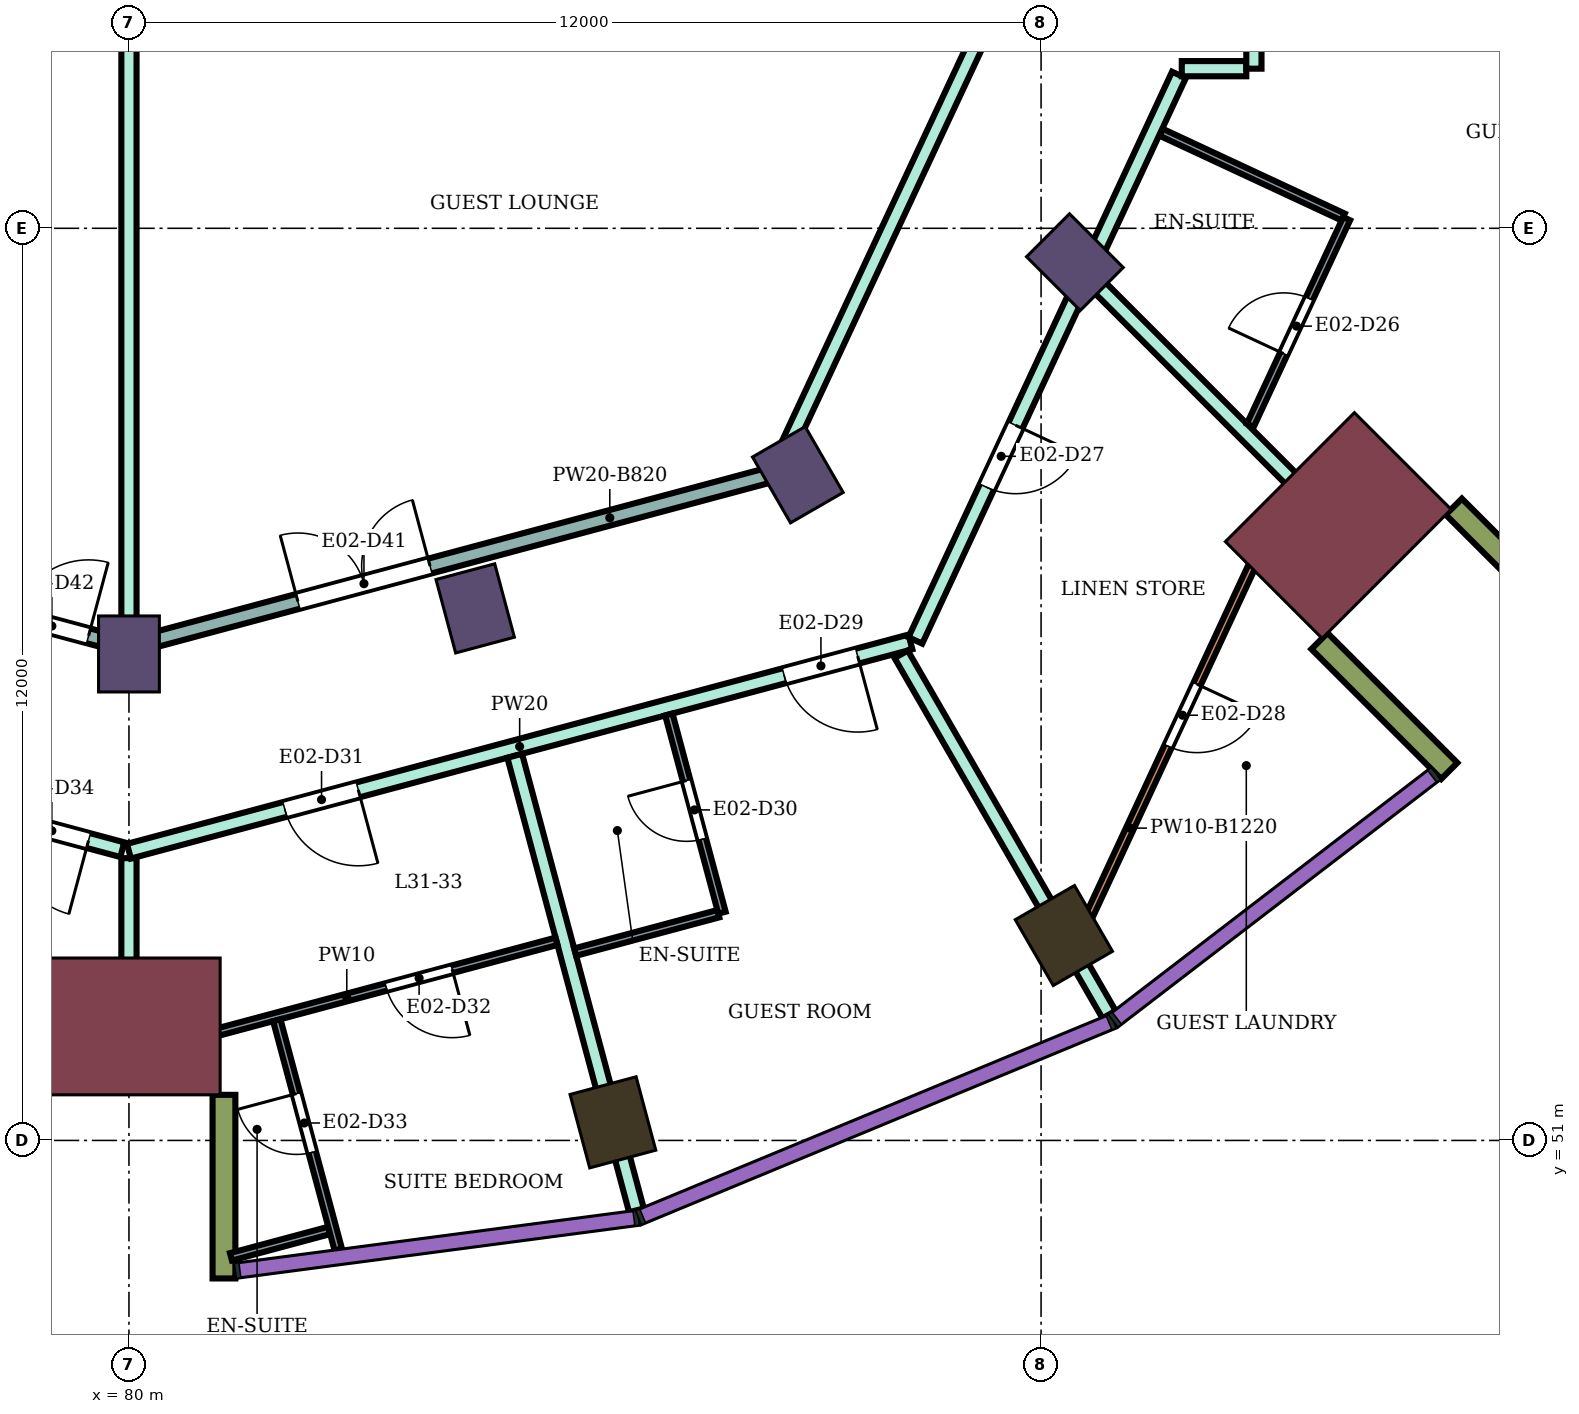
"""IFC4 building model, lengths in metres.
Left out: names, types, materials, properties, quantities, classifications, styles, units other than length and angle.
Written with IfcOpenShell. Run it as: python <this file> out.ifc"""

import sys

from ifc_helpers import new_model, si_unit, direction, frame, frame_2d, origin, origin_2d, place, context, subcontext, project, spatial, rectangle, extrude, element, fill, save


model = new_model("IFC4")
c1 = context("Model", 3, precision=1e-05, world=origin(), true_north=direction((0.0, 1.0)))
c2 = subcontext(c1, "Body", "Model", "MODEL_VIEW")
j1 = project(units=[si_unit("LENGTHUNIT", "METRE"), si_unit("PLANEANGLEUNIT", "RADIAN")], contexts=[c1])
p1 = place(None, origin())
s1 = spatial("IfcSite", under=j1, at=p1, CompositionType="ELEMENT")
p2 = place(p1, origin())
s2 = spatial("IfcBuilding", under=s1, at=p2, CompositionType="ELEMENT")
p3 = place(p2, frame((0.0, 0.0, 134.1)))
s3 = spatial("IfcBuildingStorey", under=s2, at=p3, CompositionType="ELEMENT", Elevation=134.1)
for number, where, z_axis, x_axis in (
    (1, (86.367, 51.238, 0.0), (0.0, 0.0, 1.0), (0.259, -0.966, 0.0)),
    (2, (92.3, 53.696, 0.0), (0.0, 0.0, 1.0), (0.5, -0.866, 0.0)),
):
    element("IfcColumn", number, at=place(p3, frame(where, z_axis=z_axis, x_axis=x_axis)), inside=s3, PredefinedType="COLUMN", context=c2, shape_type="SweptSolid", body=[
        extrude(rectangle(XDim=1.0, YDim=0.9, at=origin_2d()), origin(), (0.0, 0.0, 1.0), 3.9),
    ])
for number, where, z_axis, x_axis in (
    (3, (80.0, 57.4, 0.0), (0.0, 0.0, 1.0), (0.0, -1.0, 0.0)),
    (4, (84.555, 58.0, 0.0), (0.0, 0.0, 1.0), (0.259, -0.966, 0.0)),
    (5, (88.8, 59.758, 0.0), (0.0, 0.0, 1.0), (0.5, -0.866, 0.0)),
    (6, (92.445, 62.555, 0.0), (0.0, 0.0, 1.0), (0.707, -0.707, 0.0)),
):
    element("IfcColumn", number, at=place(p3, frame(where, z_axis=z_axis, x_axis=x_axis)), inside=s3, PredefinedType="COLUMN", context=c2, shape_type="SweptSolid", body=[
        extrude(rectangle(XDim=1.0, YDim=0.8, at=origin_2d()), origin(), (0.0, 0.0, 1.0), 3.9),
    ])
for number, where, z_axis, x_axis in (
    (7, (80.0, 52.5, 0.0), (0.0, 0.0, 1.0), (0.0, -1.0, 0.0)),
    (8, (95.91, 59.09, 0.0), (0.0, 0.0, 1.0), (0.707, -0.707, 0.0)),
):
    element("IfcColumn", number, at=place(p3, frame(where, z_axis=z_axis, x_axis=x_axis)), inside=s3, PredefinedType="COLUMN", context=c2, shape_type="SweptSolid", body=[
        extrude(rectangle(XDim=1.8, YDim=2.4, at=origin_2d()), origin(), (0.0, 0.0, 1.0), 3.9),
    ])
for number, where, z_axis, x_axis in (
    (9, (81.25, 51.6, 0.0), (0.0, 0.0, 1.0), (0.0, -1.0, 0.0)),
    (10, (95.662, 57.57, 0.0), (0.0, 0.0, 1.0), (0.707, -0.707, 0.0)),
    (11, (97.43, 59.338, 0.0), (0.0, 0.0, 1.0), (0.707, -0.707, 0.0)),
):
    element("IfcWall", number, at=place(p3, frame(where, z_axis=z_axis, x_axis=x_axis)), inside=s3, PredefinedType="NOTDEFINED", context=c2, shape_type="SweptSolid", body=[
        extrude(rectangle(XDim=2.416, YDim=0.3, at=frame_2d((1.208, 0.0))), origin(), (0.0, 0.0, 1.0), 3.9),
    ])
p4 = place(p3, frame((69.652, 57.578, 0.0), z_axis=(0.0, 0.0, 1.0), x_axis=(0.965851674805, -0.259095623807, 0.0)))
e12 = element("IfcWall", 12, at=p4, inside=s3, PredefinedType="PARTITIONING", context=c2, shape_type="SweptSolid", body=[
    extrude(rectangle(XDim=10.623, YDim=0.2, at=frame_2d((5.312, 0.0))), origin(), (0.0, 0.0, 1.0), 3.45),
])
p5 = place(p4, frame((9.163, 0.0, 0.0)))
e13 = element("IfcOpeningElement", 13, at=p5, cuts=e12, PredefinedType="OPENING", context=c2, shape_type="SweptSolid", body=[
    extrude(rectangle(XDim=1.0, YDim=2.1, at=frame_2d((0.5, 1.05))), frame((0.0, 0.11, 0.0), z_axis=(0.0, -1.0, 0.0), x_axis=(1.0, 0.0, 0.0)), (0.0, 0.0, 1.0), 0.22),
])
p6 = place(p3, frame((71.498, 59.774, 0.0), z_axis=(0.0, 0.0, 1.0), x_axis=(0.965912232838, -0.258869771225, 0.0)))
e14 = element("IfcWall", 14, at=p6, inside=s3, PredefinedType="PARTITIONING", context=c2, shape_type="SweptSolid", body=[
    extrude(rectangle(XDim=8.672, YDim=0.2, at=frame_2d((4.336, 0.0))), origin(), (0.0, 0.0, 1.0), 3.08),
])
p7 = place(p6, frame((7.252, 0.0, 0.0)))
e15 = element("IfcOpeningElement", 15, at=p7, cuts=e14, PredefinedType="OPENING", context=c2, shape_type="SweptSolid", body=[
    extrude(rectangle(XDim=1.0, YDim=2.1, at=frame_2d((0.5, 1.05))), frame((0.0, 0.11, 0.0), z_axis=(0.0, -1.0, 0.0), x_axis=(1.0, 0.0, 0.0)), (0.0, 0.0, 1.0), 0.22),
])
p8 = place(p3, frame((80.0, 51.8, 0.0), z_axis=(0.0, 0.0, 1.0), x_axis=(0.0, 1.0, 0.0)))
e16 = element("IfcWall", 16, at=p8, inside=s3, PredefinedType="PARTITIONING", context=c2, shape_type="SweptSolid", body=[
    extrude(rectangle(XDim=2.914, YDim=0.2, at=frame_2d((1.457, 0.0))), origin(), (0.0, 0.0, 1.0), 3.45),
])
p9 = place(p3, frame((80.0, 54.805, 0.0), z_axis=(0.0, 0.0, 1.0), x_axis=(0.965967909695, 0.258661936588, 0.0)))
e17 = element("IfcWall", 17, at=p9, inside=s3, PredefinedType="PARTITIONING", context=c2, shape_type="SweptSolid", body=[
    extrude(rectangle(XDim=10.643, YDim=0.2, at=frame_2d((5.322, 0.0))), origin(), (0.0, 0.0, 1.0), 3.45),
])
p10 = place(p9, frame((8.925, 0.0, 0.0)))
e18 = element("IfcOpeningElement", 18, at=p10, cuts=e17, PredefinedType="OPENING", context=c2, shape_type="SweptSolid", body=[
    extrude(rectangle(XDim=1.0, YDim=2.1, at=frame_2d((0.5, 1.05))), frame((0.0, 0.11, 0.0), z_axis=(0.0, -1.0, 0.0), x_axis=(1.0, 0.0, 0.0)), (0.0, 0.0, 1.0), 0.22),
])
p11 = place(p9, frame((2.123, 0.0, 0.0)))
e19 = element("IfcOpeningElement", 19, at=p11, cuts=e17, PredefinedType="OPENING", context=c2, shape_type="SweptSolid", body=[
    extrude(rectangle(XDim=1.0, YDim=2.1, at=frame_2d((0.5, 1.05))), frame((0.0, 0.11, 0.0), z_axis=(0.0, -1.0, 0.0), x_axis=(1.0, 0.0, 0.0)), (0.0, 0.0, 1.0), 0.22),
])
p12 = place(p3, frame((80.0, 57.627, 0.0), z_axis=(0.0, 0.0, 1.0), x_axis=(0.0, 1.0, 0.0)))
e20 = element("IfcWall", 20, at=p12, inside=s3, PredefinedType="PARTITIONING", context=c2, shape_type="SweptSolid", body=[
    extrude(rectangle(XDim=9.673, YDim=0.2, at=frame_2d((4.836, 0.0))), origin(), (0.0, 0.0, 1.0), 3.45),
])
p13 = place(p3, frame((80.001, 57.496, 0.0), z_axis=(0.0, 0.0, 1.0), x_axis=(0.965924211089, 0.258825073035, 0.0)))
e21 = element("IfcWall", 21, at=p13, inside=s3, PredefinedType="PARTITIONING", context=c2, shape_type="SweptSolid", body=[
    extrude(rectangle(XDim=8.731, YDim=0.2, at=frame_2d((4.365, 0.0))), origin(), (0.0, 0.0, 1.0), 3.08),
])
p14 = place(p13, frame((2.3, 0.0, 0.0)))
e22 = element("IfcOpeningElement", 22, at=p14, cuts=e21, PredefinedType="OPENING", context=c2, shape_type="SweptSolid", body=[
    extrude(rectangle(XDim=1.8, YDim=2.1, at=frame_2d((0.9, 1.05))), frame((0.0, 0.11, 0.0), z_axis=(0.0, -1.0, 0.0), x_axis=(1.0, 0.0, 0.0)), (0.0, 0.0, 1.0), 0.22),
])
p15 = place(p3, frame((85.075, 56.061, 0.0), z_axis=(0.0, 0.0, 1.0), x_axis=(0.258703231129, -0.965956851109, 0.0)))
e23 = element("IfcWall", 23, at=p15, inside=s3, PredefinedType="PARTITIONING", context=c2, shape_type="SweptSolid", body=[
    extrude(rectangle(XDim=6.191, YDim=0.2, at=frame_2d((3.095, 0.0))), origin(), (0.0, 0.0, 1.0), 3.45),
])
p16 = place(p3, frame((88.502, 59.774, 0.0), z_axis=(0.0, 0.0, 1.0), x_axis=(0.423423307095, 0.905931952747, 0.0)))
e24 = element("IfcWall", 24, at=p16, inside=s3, PredefinedType="PARTITIONING", context=c2, shape_type="SweptSolid", body=[
    extrude(rectangle(XDim=7.529, YDim=0.2, at=frame_2d((3.764, 0.0))), origin(), (0.0, 0.0, 1.0), 3.45),
])
p17 = place(p3, frame((90.16, 57.396, 0.0), z_axis=(0.0, 0.0, 1.0), x_axis=(0.499848624781, -0.86611278267, 0.0)))
e25 = element("IfcWall", 25, at=p17, inside=s3, PredefinedType="PARTITIONING", context=c2, shape_type="SweptSolid", body=[
    extrude(rectangle(XDim=5.472, YDim=0.2, at=frame_2d((2.736, 0.0))), origin(), (0.0, 0.0, 1.0), 3.45),
])
p18 = place(p3, frame((90.346, 57.578, 0.0), z_axis=(0.0, 0.0, 1.0), x_axis=(0.422476720533, 0.906373775331, 0.0)))
e26 = element("IfcWall", 26, at=p18, inside=s3, PredefinedType="PARTITIONING", context=c2, shape_type="SweptSolid", body=[
    extrude(rectangle(XDim=8.208, YDim=0.2, at=frame_2d((4.104, 0.0))), origin(), (0.0, 0.0, 1.0), 3.45),
])
p19 = place(p18, frame((2.223, 0.0, 0.0)))
e27 = element("IfcOpeningElement", 27, at=p19, cuts=e26, PredefinedType="OPENING", context=c2, shape_type="SweptSolid", body=[
    extrude(rectangle(XDim=0.9, YDim=2.1, at=frame_2d((0.45, 1.05))), frame((0.0, 0.11, 0.0), z_axis=(0.0, -1.0, 0.0), x_axis=(1.0, 0.0, 0.0)), (0.0, 0.0, 1.0), 0.22),
])
p20 = place(p3, frame((92.692, 62.303, 0.0), z_axis=(0.0, 0.0, 1.0), x_axis=(0.706943936447, -0.707269588432, 0.0)))
e28 = element("IfcWall", 28, at=p20, inside=s3, PredefinedType="PARTITIONING", context=c2, shape_type="SweptSolid", body=[
    extrude(rectangle(XDim=5.248, YDim=0.2, at=frame_2d((2.624, 0.0))), origin(), (0.0, 0.0, 1.0), 3.45),
])
p21 = place(p3, frame((93.851, 65.1, 0.0), z_axis=(0.0, 0.0, 1.0), x_axis=(1.0, 0.0, 0.0)))
e29 = element("IfcWall", 29, at=p21, inside=s3, PredefinedType="PARTITIONING", context=c2, shape_type="SweptSolid", body=[
    extrude(rectangle(XDim=0.849, YDim=0.2, at=frame_2d((0.424, 0.0))), origin(), (0.0, 0.0, 1.0), 3.45),
])
p22 = place(p3, frame((94.8, 65.1, 0.0), z_axis=(0.0, 0.0, 1.0), x_axis=(0.0, 1.0, 0.0)))
e30 = element("IfcWall", 30, at=p22, inside=s3, PredefinedType="PARTITIONING", context=c2, shape_type="SweptSolid", body=[
    extrude(rectangle(XDim=1.499, YDim=0.2, at=frame_2d((0.75, 0.0))), origin(), (0.0, 0.0, 1.0), 3.45),
])
p23 = place(p22, frame((0.25, 0.0, 0.0)))
e31 = element("IfcOpeningElement", 31, at=p23, cuts=e30, PredefinedType="OPENING", context=c2, shape_type="SweptSolid", body=[
    extrude(rectangle(XDim=1.0, YDim=2.1, at=frame_2d((0.5, 1.05))), frame((0.0, 0.11, 0.0), z_axis=(0.0, -1.0, 0.0), x_axis=(1.0, 0.0, 0.0)), (0.0, 0.0, 1.0), 0.22),
])
p24 = place(p3, frame((80.106, 52.14, 0.0), z_axis=(0.0, 0.0, 1.0), x_axis=(0.965888724411, 0.25895747152, 0.0)))
e32 = element("IfcWall", 32, at=p24, inside=s3, PredefinedType="PARTITIONING", context=c2, shape_type="SweptSolid", body=[
    extrude(rectangle(XDim=5.714, YDim=0.1, at=frame_2d((2.857, 0.0))), origin(), (0.0, 0.0, 1.0), 3.45),
])
p25 = place(p24, frame((3.392, 0.0, 0.0)))
e33 = element("IfcOpeningElement", 33, at=p25, cuts=e32, PredefinedType="OPENING", context=c2, shape_type="SweptSolid", body=[
    extrude(rectangle(XDim=0.9, YDim=2.1, at=frame_2d((0.45, 1.05))), frame((0.0, 0.06, 0.0), z_axis=(0.0, -1.0, 0.0), x_axis=(1.0, 0.0, 0.0)), (0.0, 0.0, 1.0), 0.12),
])
p26 = place(p3, frame((81.342, 49.469, 0.0), z_axis=(0.0, 0.0, 1.0), x_axis=(0.965825019766, 0.259194967533, 0.0)))
e34 = element("IfcWall", 34, at=p26, inside=s3, PredefinedType="PARTITIONING", context=c2, shape_type="SweptSolid", body=[
    extrude(rectangle(XDim=1.338, YDim=0.1, at=frame_2d((0.669, 0.0))), origin(), (0.0, 0.0, 1.0), 3.45),
])
p27 = place(p3, frame((81.945, 52.582, 0.0), z_axis=(0.0, 0.0, 1.0), x_axis=(0.258941837668, -0.965892915755, 0.0)))
e35 = element("IfcWall", 35, at=p27, inside=s3, PredefinedType="PARTITIONING", context=c2, shape_type="SweptSolid", body=[
    extrude(rectangle(XDim=3.124, YDim=0.1, at=frame_2d((1.562, 0.0))), origin(), (0.0, 0.0, 1.0), 3.45),
])
p28 = place(p27, frame((1.0, 0.0, 0.0)))
e36 = element("IfcOpeningElement", 36, at=p28, cuts=e35, PredefinedType="OPENING", context=c2, shape_type="SweptSolid", body=[
    extrude(rectangle(XDim=0.8, YDim=2.1, at=frame_2d((0.4, 1.05))), frame((0.0, 0.06, 0.0), z_axis=(0.0, -1.0, 0.0), x_axis=(1.0, 0.0, 0.0)), (0.0, 0.0, 1.0), 0.12),
])
p29 = place(p3, frame((85.871, 53.478, 0.0), z_axis=(0.0, 0.0, 1.0), x_axis=(0.965853538138, 0.25908867761, 0.0)))
e37 = element("IfcWall", 37, at=p29, inside=s3, PredefinedType="PARTITIONING", context=c2, shape_type="SweptSolid", body=[
    extrude(rectangle(XDim=1.95, YDim=0.1, at=frame_2d((0.975, 0.0))), origin(), (0.0, 0.0, 1.0), 3.45),
])
p30 = place(p3, frame((87.103, 56.604, 0.0), z_axis=(0.0, 0.0, 1.0), x_axis=(0.258883730688, -0.965908491517, 0.0)))
e38 = element("IfcWall", 38, at=p30, inside=s3, PredefinedType="PARTITIONING", context=c2, shape_type="SweptSolid", body=[
    extrude(rectangle(XDim=2.7, YDim=0.1, at=frame_2d((1.35, 0.0))), origin(), (0.0, 0.0, 1.0), 3.45),
])
p31 = place(p30, frame((0.9, 0.0, 0.0)))
e39 = element("IfcOpeningElement", 39, at=p31, cuts=e38, PredefinedType="OPENING", context=c2, shape_type="SweptSolid", body=[
    extrude(rectangle(XDim=0.8, YDim=2.1, at=frame_2d((0.4, 1.05))), frame((0.0, 0.06, 0.0), z_axis=(0.0, -1.0, 0.0), x_axis=(1.0, 0.0, 0.0)), (0.0, 0.0, 1.0), 0.12),
])
p32 = place(p3, frame((92.477, 53.619, 0.0), z_axis=(0.0, 0.0, 1.0), x_axis=(0.421913254756, 0.90663620348, 0.0)))
e40 = element("IfcWall", 40, at=p32, inside=s3, PredefinedType="PARTITIONING", context=c2, shape_type="SweptSolid", body=[
    extrude(rectangle(XDim=6.573, YDim=0.1, at=frame_2d((3.287, 0.0))), origin(), (0.0, 0.0, 1.0), 2.68),
])
p33 = place(p32, frame((2.831, 0.0, 0.0)))
e41 = element("IfcOpeningElement", 41, at=p33, cuts=e40, PredefinedType="OPENING", context=c2, shape_type="SweptSolid", body=[
    extrude(rectangle(XDim=0.9, YDim=2.1, at=frame_2d((0.45, 1.05))), frame((0.0, 0.06, 0.0), z_axis=(0.0, -1.0, 0.0), x_axis=(1.0, 0.0, 0.0)), (0.0, 0.0, 1.0), 0.12),
])
p34 = place(p3, frame((93.582, 64.263, 0.0), z_axis=(0.0, 0.0, 1.0), x_axis=(0.906494794209, -0.422216991691, 0.0)))
e42 = element("IfcWall", 42, at=p34, inside=s3, PredefinedType="PARTITIONING", context=c2, shape_type="SweptSolid", body=[
    extrude(rectangle(XDim=2.64, YDim=0.1, at=frame_2d((1.32, 0.0))), origin(), (0.0, 0.0, 1.0), 3.45),
])
p35 = place(p3, frame((94.753, 60.408, 0.0), z_axis=(0.0, 0.0, 1.0), x_axis=(0.422435455794, 0.906393008406, 0.0)))
e43 = element("IfcWall", 43, at=p35, inside=s3, PredefinedType="PARTITIONING", context=c2, shape_type="SweptSolid", body=[
    extrude(rectangle(XDim=3.0, YDim=0.1, at=frame_2d((1.5, 0.0))), origin(), (0.0, 0.0, 1.0), 3.45),
])
p36 = place(p35, frame((1.04, 0.0, 0.0)))
e44 = element("IfcOpeningElement", 44, at=p36, cuts=e43, PredefinedType="OPENING", context=c2, shape_type="SweptSolid", body=[
    extrude(rectangle(XDim=0.8, YDim=2.1, at=frame_2d((0.4, 1.05))), frame((0.0, 0.06, 0.0), z_axis=(0.0, -1.0, 0.0), x_axis=(1.0, 0.0, 0.0)), (0.0, 0.0, 1.0), 0.12),
])
p37 = place(p36, origin())
e45 = element("IfcDoor", 45, at=p37, inside=s3, OperationType="SINGLE_SWING_LEFT", PredefinedType="DOOR", context=c2, shape_type="SweptSolid", body=[
    extrude(rectangle(XDim=0.8, YDim=2.1, at=frame_2d((0.4, 1.05))), frame((0.0, 0.025, 0.0), z_axis=(0.0, -1.0, 0.0), x_axis=(1.0, 0.0, 0.0)), (0.0, 0.0, 1.0), 0.05),
])
fill(e44, e45)
p38 = place(p19, frame((0.9, 0.0, 0.0), z_axis=(0.0, 0.0, 1.0), x_axis=(-1.0, 0.0, 0.0)))
e46 = element("IfcDoor", 46, at=p38, inside=s3, OperationType="SINGLE_SWING_LEFT", PredefinedType="DOOR", context=c2, shape_type="SweptSolid", body=[
    extrude(rectangle(XDim=0.9, YDim=2.1, at=frame_2d((0.45, 1.05))), frame((0.0, 0.025, 0.0), z_axis=(0.0, -1.0, 0.0), x_axis=(1.0, 0.0, 0.0)), (0.0, 0.0, 1.0), 0.05),
])
fill(e27, e46)
p39 = place(p33, frame((0.9, 0.0, 0.0), z_axis=(0.0, 0.0, 1.0), x_axis=(-1.0, 0.0, 0.0)))
e47 = element("IfcDoor", 47, at=p39, inside=s3, OperationType="SINGLE_SWING_LEFT", PredefinedType="DOOR", context=c2, shape_type="SweptSolid", body=[
    extrude(rectangle(XDim=0.9, YDim=2.1, at=frame_2d((0.45, 1.05))), frame((0.0, 0.025, 0.0), z_axis=(0.0, -1.0, 0.0), x_axis=(1.0, 0.0, 0.0)), (0.0, 0.0, 1.0), 0.05),
])
fill(e41, e47)
p40 = place(p10, frame((1.0, 0.0, 0.0), z_axis=(0.0, 0.0, 1.0), x_axis=(-1.0, 0.0, 0.0)))
e48 = element("IfcDoor", 48, at=p40, inside=s3, OperationType="SINGLE_SWING_LEFT", PredefinedType="DOOR", context=c2, shape_type="SweptSolid", body=[
    extrude(rectangle(XDim=1.0, YDim=2.1, at=frame_2d((0.5, 1.05))), frame((0.0, 0.025, 0.0), z_axis=(0.0, -1.0, 0.0), x_axis=(1.0, 0.0, 0.0)), (0.0, 0.0, 1.0), 0.05),
])
fill(e18, e48)
p41 = place(p31, frame((0.8, 0.0, 0.0), z_axis=(0.0, 0.0, 1.0), x_axis=(-1.0, 0.0, 0.0)))
e49 = element("IfcDoor", 49, at=p41, inside=s3, OperationType="SINGLE_SWING_RIGHT", PredefinedType="DOOR", context=c2, shape_type="SweptSolid", body=[
    extrude(rectangle(XDim=0.8, YDim=2.1, at=frame_2d((0.4, 1.05))), frame((0.0, 0.025, 0.0), z_axis=(0.0, -1.0, 0.0), x_axis=(1.0, 0.0, 0.0)), (0.0, 0.0, 1.0), 0.05),
])
fill(e39, e49)
p42 = place(p11, frame((1.0, 0.0, 0.0), z_axis=(0.0, 0.0, 1.0), x_axis=(-1.0, 0.0, 0.0)))
e50 = element("IfcDoor", 50, at=p42, inside=s3, OperationType="SINGLE_SWING_LEFT", PredefinedType="DOOR", context=c2, shape_type="SweptSolid", body=[
    extrude(rectangle(XDim=1.0, YDim=2.1, at=frame_2d((0.5, 1.05))), frame((0.0, 0.025, 0.0), z_axis=(0.0, -1.0, 0.0), x_axis=(1.0, 0.0, 0.0)), (0.0, 0.0, 1.0), 0.05),
])
fill(e19, e50)
p43 = place(p25, frame((0.9, 0.0, 0.0), z_axis=(0.0, 0.0, 1.0), x_axis=(-1.0, 0.0, 0.0)))
e51 = element("IfcDoor", 51, at=p43, inside=s3, OperationType="SINGLE_SWING_LEFT", PredefinedType="DOOR", context=c2, shape_type="SweptSolid", body=[
    extrude(rectangle(XDim=0.9, YDim=2.1, at=frame_2d((0.45, 1.05))), frame((0.0, 0.025, 0.0), z_axis=(0.0, -1.0, 0.0), x_axis=(1.0, 0.0, 0.0)), (0.0, 0.0, 1.0), 0.05),
])
fill(e33, e51)
p44 = place(p28, frame((0.8, 0.0, 0.0), z_axis=(0.0, 0.0, 1.0), x_axis=(-1.0, 0.0, 0.0)))
e52 = element("IfcDoor", 52, at=p44, inside=s3, OperationType="SINGLE_SWING_RIGHT", PredefinedType="DOOR", context=c2, shape_type="SweptSolid", body=[
    extrude(rectangle(XDim=0.8, YDim=2.1, at=frame_2d((0.4, 1.05))), frame((0.0, 0.025, 0.0), z_axis=(0.0, -1.0, 0.0), x_axis=(1.0, 0.0, 0.0)), (0.0, 0.0, 1.0), 0.05),
])
fill(e36, e52)
p45 = place(p5, frame((1.0, 0.0, 0.0), z_axis=(0.0, 0.0, 1.0), x_axis=(-1.0, 0.0, 0.0)))
e53 = element("IfcDoor", 53, at=p45, inside=s3, OperationType="SINGLE_SWING_LEFT", PredefinedType="DOOR", context=c2, shape_type="SweptSolid", body=[
    extrude(rectangle(XDim=1.0, YDim=2.1, at=frame_2d((0.5, 1.05))), frame((0.0, 0.025, 0.0), z_axis=(0.0, -1.0, 0.0), x_axis=(1.0, 0.0, 0.0)), (0.0, 0.0, 1.0), 0.05),
])
fill(e13, e53)
p46 = place(p14, origin())
e54 = element("IfcDoor", 54, at=p46, inside=s3, OperationType="DOUBLE_DOOR_SINGLE_SWING", PredefinedType="DOOR", context=c2, shape_type="SweptSolid", body=[
    extrude(rectangle(XDim=1.8, YDim=2.1, at=frame_2d((0.9, 1.05))), frame((0.0, 0.025, 0.0), z_axis=(0.0, -1.0, 0.0), x_axis=(1.0, 0.0, 0.0)), (0.0, 0.0, 1.0), 0.05),
])
fill(e22, e54)
p47 = place(p7, origin())
e55 = element("IfcDoor", 55, at=p47, inside=s3, OperationType="SINGLE_SWING_RIGHT", PredefinedType="DOOR", context=c2, shape_type="SweptSolid", body=[
    extrude(rectangle(XDim=1.0, YDim=2.1, at=frame_2d((0.5, 1.05))), frame((0.0, 0.025, 0.0), z_axis=(0.0, -1.0, 0.0), x_axis=(1.0, 0.0, 0.0)), (0.0, 0.0, 1.0), 0.05),
])
fill(e15, e55)
save(model, sys.argv[1])
